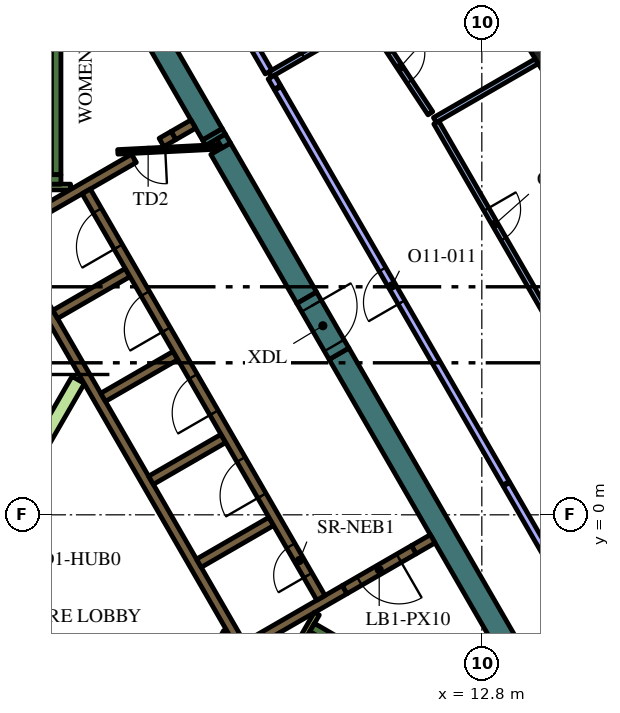
"""IFC4 building model, lengths in metres.
Left out: names, types, materials, properties, quantities, classifications, styles, units other than length and angle.
Written with IfcOpenShell. Run it as: python <this file> out.ifc"""

import sys

from ifc_helpers import new_model, si_unit, direction, frame, frame_2d, origin, origin_2d, place, context, subcontext, project, spatial, polyline, rectangle, outline, extrude, element, fill, save


model = new_model("IFC4")
c1 = context("Model", 3, precision=1e-05, world=origin(), true_north=direction((0.0, 1.0)))
c2 = subcontext(c1, "Body", "Model", "MODEL_VIEW")
j1 = project(units=[si_unit("LENGTHUNIT", "METRE"), si_unit("PLANEANGLEUNIT", "RADIAN")], contexts=[c1])
p1 = place(None, origin())
s1 = spatial("IfcSite", under=j1, at=p1, CompositionType="ELEMENT")
p2 = place(p1, origin())
s2 = spatial("IfcBuilding", under=s1, at=p2, CompositionType="ELEMENT")
p3 = place(p2, frame((0.0, 0.0, 267.0)))
s3 = spatial("IfcBuildingStorey", under=s2, at=p3, CompositionType="ELEMENT", Elevation=267.0)
p4 = place(p3, frame((14.556, 12.098, 0.0), z_axis=(0.0, 0.0, 1.0), x_axis=(-0.525609744083, 0.850725805959, 0.0)))
e1 = element("IfcColumn", 1, at=p4, inside=s3, PredefinedType="COLUMN", context=c2, shape_type="SweptSolid", body=[
    extrude(rectangle(XDim=1.0, YDim=0.7, at=origin_2d()), origin(), (0.0, 0.0, 1.0), 4.2),
])
p5 = place(p3, frame((9.042, 4.239, 0.0), z_axis=(0.0, 0.0, 1.0), x_axis=(0.500005785455, -0.866022063525, 0.0)))
e2 = element("IfcWall", 2, at=p5, inside=s3, PredefinedType="SOLIDWALL", context=c2, shape_type="SweptSolid", body=[
    extrude(rectangle(XDim=12.406, YDim=0.6, at=frame_2d((6.203, 0.0))), origin(), (0.0, 0.0, 1.0), 4.2),
])
p6 = place(p3, frame((5.709, 10.012, 0.0), z_axis=(0.0, 0.0, 1.0), x_axis=(0.500399834964, -0.865794435861, 0.0)))
e3 = element("IfcWall", 3, at=p6, inside=s3, PredefinedType="SOLIDWALL", context=c2, shape_type="SweptSolid", body=[
    extrude(rectangle(XDim=0.166, YDim=0.6, at=frame_2d((0.083, 0.0))), origin(), (0.0, 0.0, 1.0), 4.2),
])
p7 = place(p3, frame((5.928, 9.633, 0.0), z_axis=(0.0, 0.0, 1.0), x_axis=(0.499983823482, -0.8660347431, 0.0)))
e4 = element("IfcWall", 4, at=p7, inside=s3, PredefinedType="SOLIDWALL", context=c2, shape_type="SweptSolid", body=[
    extrude(rectangle(XDim=4.528, YDim=0.6, at=frame_2d((2.264, 0.0))), origin(), (0.0, 0.0, 1.0), 4.2),
])
p8 = place(p3, origin())
e5 = element("IfcWall", 5, at=p8, inside=s3, PredefinedType="SOLIDWALL", context=c2, shape_type="SweptSolid", body=[
    extrude(outline(polyline([(6.053, 10.016), (6.187, 9.784), (5.961, 9.654), (5.827, 9.886), (6.053, 10.016)])), origin(), (0.0, 0.0, 1.0), 4.2),
])
p9 = place(p3, frame((1.989, 16.456, 0.0), z_axis=(0.0, 0.0, 1.0), x_axis=(0.499990476767, -0.866030901956, 0.0)))
e6 = element("IfcWall", 6, at=p9, inside=s3, PredefinedType="SOLIDWALL", context=c2, shape_type="SweptSolid", body=[
    extrude(rectangle(XDim=7.438, YDim=0.6, at=frame_2d((3.719, 0.0))), origin(), (0.0, 0.0, 1.0), 4.2),
])
p10 = place(p3, frame((8.334, -2.964, 0.0), z_axis=(0.0, 0.0, 1.0), x_axis=(0.866016039709, -0.500016218704, 0.0)))
e7 = element("IfcWall", 7, at=p10, inside=s3, PredefinedType="SOLIDWALL", context=c2, shape_type="SweptSolid", body=[
    extrude(rectangle(XDim=7.05, YDim=0.25, at=frame_2d((3.525, 0.0))), origin(), (0.0, 0.0, 1.0), 4.2),
])
p11 = place(p3, frame((8.168, -3.503, 0.0), z_axis=(0.0, 0.0, 1.0), x_axis=(0.49972245349, 0.866185586049, 0.0)))
e8 = element("IfcWall", 8, at=p11, inside=s3, PredefinedType="SOLIDWALL", context=c2, shape_type="SweptSolid", body=[
    extrude(rectangle(XDim=0.425, YDim=0.25, at=frame_2d((0.212, 0.0))), origin(), (0.0, 0.0, 1.0), 4.2),
])
p12 = place(p3, frame((1.6, 8.95, 0.0), z_axis=(0.0, 0.0, 1.0), x_axis=(0.0, 1.0, 0.0)))
e9 = element("IfcWall", 9, at=p12, inside=s3, PredefinedType="SOLIDWALL", context=c2, shape_type="SweptSolid", body=[
    extrude(rectangle(XDim=6.8, YDim=0.25, at=frame_2d((3.4, 0.0))), origin(), (0.0, 0.0, 1.0), 4.2),
])
p13 = place(p3, frame((1.05, 8.825, 0.0), z_axis=(0.0, 0.0, 1.0), x_axis=(1.0, 0.0, 0.0)))
e10 = element("IfcWall", 10, at=p13, inside=s3, PredefinedType="SOLIDWALL", context=c2, shape_type="SweptSolid", body=[
    extrude(rectangle(XDim=0.675, YDim=0.25, at=frame_2d((0.337, 0.0))), origin(), (0.0, 0.0, 1.0), 4.2),
])
p14 = place(p3, frame((11.507, -0.631, 0.0), z_axis=(0.0, 0.0, 1.0), x_axis=(-0.866093731455, -0.499881634324, 0.0)))
e11 = element("IfcWall", 11, at=p14, inside=s3, PredefinedType="SOLIDWALL", context=c2, shape_type="SweptSolid", body=[
    extrude(rectangle(XDim=0.575, YDim=0.25, at=frame_2d((0.288, 0.0))), origin(), (0.0, 0.0, 1.0), 4.2),
])
p15 = place(p3, frame((6.568, -3.627, 0.0), z_axis=(0.0, 0.0, 1.0), x_axis=(-0.499999455981, 0.866025717874, 0.0)))
e12 = element("IfcWall", 12, at=p15, inside=s3, PredefinedType="SOLIDWALL", context=c2, shape_type="SweptSolid", body=[
    extrude(rectangle(XDim=11.978, YDim=0.25, at=frame_2d((5.989, 0.0))), origin(), (0.0, 0.0, 1.0), 4.2),
])
p16 = place(p3, frame((3.647, 9.38, 0.0), z_axis=(0.0, 0.0, 1.0), x_axis=(-0.866025015791, -0.500000672024, 0.0)))
e13 = element("IfcWall", 13, at=p16, inside=s3, PredefinedType="SOLIDWALL", context=c2, shape_type="SweptSolid", body=[
    extrude(rectangle(XDim=3.849, YDim=0.25, at=frame_2d((1.924, 0.0))), origin(), (0.0, 0.0, 1.0), 4.2),
])
p17 = place(p3, frame((1.574, 5.274, 0.0), z_axis=(0.0, 0.0, 1.0), x_axis=(0.866028486751, 0.499994660107, 0.0)))
e14 = element("IfcWall", 14, at=p17, inside=s3, PredefinedType="SOLIDWALL", context=c2, shape_type="SweptSolid", body=[
    extrude(rectangle(XDim=2.2, YDim=0.25, at=frame_2d((1.1, 0.0))), origin(), (0.0, 0.0, 1.0), 4.2),
])
for number, where, z_axis, x_axis in (
    (15, (2.834, 3.091, 0.0), (0.0, 0.0, 1.0), (0.866, 0.5, 0.0)),
    (16, (4.094, 0.909, 0.0), (0.0, 0.0, 1.0), (0.866, 0.5, 0.0)),
    (17, (5.354, -1.274, 0.0), (0.0, 0.0, 1.0), (0.866, 0.5, 0.0)),
):
    element("IfcWall", number, at=place(p3, frame(where, z_axis=z_axis, x_axis=x_axis)), inside=s3, PredefinedType="SOLIDWALL", context=c2, shape_type="SweptSolid", body=[
        extrude(rectangle(XDim=2.2, YDim=0.25, at=frame_2d((1.1, 0.0))), origin(), (0.0, 0.0, 1.0), 4.2),
    ])
p18 = place(p3, frame((6.614, -3.456, 0.0), z_axis=(0.0, 0.0, 1.0), x_axis=(0.866032512851, 0.499987686533, 0.0)))
e18 = element("IfcWall", 18, at=p18, inside=s3, PredefinedType="SOLIDWALL", context=c2, shape_type="SweptSolid", body=[
    extrude(rectangle(XDim=2.975, YDim=0.25, at=frame_2d((1.487, 0.0))), origin(), (0.0, 0.0, 1.0), 4.2),
])
p19 = place(p3, frame((4.688, 9.981, 0.0), z_axis=(0.0, 0.0, 1.0), x_axis=(-0.865974312977, -0.500088481434, 0.0)))
e19 = element("IfcWall", 19, at=p19, inside=s3, PredefinedType="SOLIDWALL", context=c2, shape_type="SweptSolid", body=[
    extrude(rectangle(XDim=0.366, YDim=0.25, at=frame_2d((0.183, 0.0))), origin(), (0.0, 0.0, 1.0), 4.2),
])
p20 = place(p3, frame((4.689, 9.982, 0.0), z_axis=(0.0, 0.0, 1.0), x_axis=(0.865947592822, 0.500134748329, 0.0)))
e20 = element("IfcWall", 20, at=p20, inside=s3, PredefinedType="SOLIDWALL", context=c2, shape_type="SweptSolid", body=[
    extrude(rectangle(XDim=0.598, YDim=0.25, at=frame_2d((0.299, 0.0))), origin(), (0.0, 0.0, 1.0), 4.2),
])
p21 = place(p3, frame((1.05, 8.625, 0.0), z_axis=(0.0, 0.0, 1.0), x_axis=(1.0, 0.0, 0.0)))
e21 = element("IfcWall", 21, at=p21, inside=s3, PredefinedType="PARTITIONING", context=c2, shape_type="SweptSolid", body=[
    extrude(rectangle(XDim=0.929, YDim=0.15, at=frame_2d((0.464, 0.0))), origin(), (0.0, 0.0, 1.0), 3.55),
])
p22 = place(p3, frame((8.459, -2.599, 0.0), z_axis=(0.0, 0.0, 1.0), x_axis=(-0.500041054325, -0.866001699761, 0.0)))
e22 = element("IfcWall", 22, at=p22, inside=s3, PredefinedType="PARTITIONING", context=c2, shape_type="SweptSolid", body=[
    extrude(rectangle(XDim=0.929, YDim=0.15, at=frame_2d((0.464, 0.0))), origin(), (0.0, 0.0, 1.0), 4.2),
])
p23 = place(p3, frame((5.705, -3.718, 0.0), z_axis=(0.0, 0.0, 1.0), x_axis=(0.499962090823, 0.866047289552, 0.0)))
e23 = element("IfcWall", 23, at=p23, inside=s3, PredefinedType="PARTITIONING", context=c2, shape_type="SweptSolid", body=[
    extrude(rectangle(XDim=0.735, YDim=0.15, at=frame_2d((0.367, 0.0))), origin(), (0.0, 0.0, 1.0), 3.55),
])
e24 = element("IfcWall", 24, at=p8, inside=s3, PredefinedType="PARTITIONING", context=c2, shape_type="SweptSolid", body=[
    extrude(outline(polyline([(2.017, 3.643), (2.342, 3.456), (0.785, 0.76), (0.46, 0.947), (2.017, 3.643)])), origin(), (0.0, 0.0, 1.0), 3.55),
])
p24 = place(p3, frame((8.565, -2.185, 0.0), z_axis=(0.0, 0.0, 1.0), x_axis=(-0.499997954832, 0.866026584559, 0.0)))
e25 = element("IfcWall", 25, at=p24, inside=s3, PredefinedType="SOLIDWALL", context=c2, shape_type="SweptSolid", body=[
    extrude(rectangle(XDim=12.35, YDim=0.25, at=frame_2d((6.175, 0.0))), origin(), (0.0, 0.0, 1.0), 4.2),
])
p25 = place(p24, frame((0.685, 0.0, 0.0)))
e26 = element("IfcOpeningElement", 26, at=p25, cuts=e25, PredefinedType="OPENING", context=c2, shape_type="SweptSolid", body=[
    extrude(rectangle(XDim=0.9, YDim=2.1, at=frame_2d((0.45, 1.05))), frame((0.0, 0.135, 0.0), z_axis=(0.0, -1.0, 0.0), x_axis=(1.0, 0.0, 0.0)), (0.0, 0.0, 1.0), 0.27),
])
p26 = place(p24, frame((3.105, 0.0, 0.0)))
e27 = element("IfcOpeningElement", 27, at=p26, cuts=e25, PredefinedType="OPENING", context=c2, shape_type="SweptSolid", body=[
    extrude(rectangle(XDim=1.1, YDim=2.1, at=frame_2d((0.55, 1.05))), frame((0.0, 0.135, 0.0), z_axis=(0.0, -1.0, 0.0), x_axis=(1.0, 0.0, 0.0)), (0.0, 0.0, 1.0), 0.27),
])
p27 = place(p24, frame((5.625, 0.0, 0.0)))
e28 = element("IfcOpeningElement", 28, at=p27, cuts=e25, PredefinedType="OPENING", context=c2, shape_type="SweptSolid", body=[
    extrude(rectangle(XDim=1.1, YDim=2.1, at=frame_2d((0.55, 1.05))), frame((0.0, 0.135, 0.0), z_axis=(0.0, -1.0, 0.0), x_axis=(1.0, 0.0, 0.0)), (0.0, 0.0, 1.0), 0.27),
])
p28 = place(p24, frame((8.145, 0.0, 0.0)))
e29 = element("IfcOpeningElement", 29, at=p28, cuts=e25, PredefinedType="OPENING", context=c2, shape_type="SweptSolid", body=[
    extrude(rectangle(XDim=1.1, YDim=2.1, at=frame_2d((0.55, 1.05))), frame((0.0, 0.135, 0.0), z_axis=(0.0, -1.0, 0.0), x_axis=(1.0, 0.0, 0.0)), (0.0, 0.0, 1.0), 0.27),
])
p29 = place(p24, frame((10.665, 0.0, 0.0)))
e30 = element("IfcOpeningElement", 30, at=p29, cuts=e25, PredefinedType="OPENING", context=c2, shape_type="SweptSolid", body=[
    extrude(rectangle(XDim=1.1, YDim=2.1, at=frame_2d((0.55, 1.05))), frame((0.0, 0.135, 0.0), z_axis=(0.0, -1.0, 0.0), x_axis=(1.0, 0.0, 0.0)), (0.0, 0.0, 1.0), 0.27),
])
p30 = place(p3, frame((5.917, 9.684, 0.0), z_axis=(0.0, 0.0, 1.0), x_axis=(-0.998758194515, -0.049820366212, 0.0)))
e31 = element("IfcWall", 31, at=p30, inside=s3, PredefinedType="PARTITIONING", context=c2, shape_type="SweptSolid", body=[
    extrude(rectangle(XDim=2.7, YDim=0.12, at=frame_2d((1.35, 0.0))), origin(), (0.0, 0.0, 1.0), 3.55),
])
p31 = place(p30, frame((1.45, 0.0, 0.0)))
e32 = element("IfcOpeningElement", 32, at=p31, cuts=e31, PredefinedType="OPENING", context=c2, shape_type="SweptSolid", body=[
    extrude(rectangle(XDim=0.9, YDim=2.1, at=frame_2d((0.45, 1.05))), frame((0.0, 0.07, 0.0), z_axis=(0.0, -1.0, 0.0), x_axis=(1.0, 0.0, 0.0)), (0.0, 0.0, 1.0), 0.14),
])
p32 = place(p3, frame((11.009, -0.919, 0.0), z_axis=(0.0, 0.0, 1.0), x_axis=(-0.866059744384, -0.49994051562, 0.0)))
e33 = element("IfcWall", 33, at=p32, inside=s3, PredefinedType="SOLIDWALL", context=c2, shape_type="SweptSolid", body=[
    extrude(rectangle(XDim=2.1, YDim=0.25, at=frame_2d((1.05, 0.0))), origin(), (0.0, 0.0, 1.0), 4.2),
])
p33 = place(p32, frame((0.45, 0.0, 0.0)))
e34 = element("IfcOpeningElement", 34, at=p33, cuts=e33, PredefinedType="OPENING", context=c2, shape_type="SweptSolid", body=[
    extrude(rectangle(XDim=1.2, YDim=2.1, at=frame_2d((0.6, 1.05))), frame((0.0, 0.135, 0.0), z_axis=(0.0, -1.0, 0.0), x_axis=(1.0, 0.0, 0.0)), (0.0, 0.0, 1.0), 0.27),
])
p34 = place(p3, frame((8.192, 5.711, 0.0), z_axis=(0.0, 0.0, 1.0), x_axis=(0.500062241894, -0.865989465428, 0.0)))
e35 = element("IfcWall", 35, at=p34, inside=s3, PredefinedType="SOLIDWALL", context=c2, shape_type="SweptSolid", body=[
    extrude(rectangle(XDim=1.7, YDim=0.6, at=frame_2d((0.85, 0.0))), origin(), (0.0, 0.0, 1.0), 4.2),
])
p35 = place(p34, frame((0.25, 0.0, 0.0)))
e36 = element("IfcOpeningElement", 36, at=p35, cuts=e35, PredefinedType="OPENING", context=c2, shape_type="SweptSolid", body=[
    extrude(rectangle(XDim=1.2, YDim=2.1, at=frame_2d((0.6, 1.05))), frame((0.0, 0.31, 0.0), z_axis=(0.0, -1.0, 0.0), x_axis=(1.0, 0.0, 0.0)), (0.0, 0.0, 1.0), 0.62),
])
p36 = place(p3, frame((11.564, 10.387, 0.0), z_axis=(0.0, 0.0, 1.0), x_axis=(0.86604641216, 0.499963610661, 0.0)))
e37 = element("IfcWall", 37, at=p36, inside=s3, PredefinedType="PARTITIONING", context=c2, shape_type="SweptSolid", body=[
    extrude(rectangle(XDim=3.096, YDim=0.15, at=frame_2d((1.548, 0.0))), origin(), (0.0, 0.0, 1.0), 3.55),
])
p37 = place(p3, frame((11.602, 10.322, 0.0), z_axis=(0.0, 0.0, 1.0), x_axis=(0.499989914735, -0.866031226437, 0.0)))
e38 = element("IfcWall", 38, at=p37, inside=s3, PredefinedType="PARTITIONING", context=c2, shape_type="SweptSolid", body=[
    extrude(rectangle(XDim=6.137, YDim=0.15, at=frame_2d((3.068, 0.0))), origin(), (0.0, 0.0, 1.0), 3.55),
])
p38 = place(p37, frame((2.637, 0.0, 0.0)))
e39 = element("IfcOpeningElement", 39, at=p38, cuts=e38, PredefinedType="OPENING", context=c2, shape_type="SweptSolid", body=[
    extrude(rectangle(XDim=0.9, YDim=2.1, at=frame_2d((0.45, 1.05))), frame((0.0, 0.085, 0.0), z_axis=(0.0, -1.0, 0.0), x_axis=(1.0, 0.0, 0.0)), (0.0, 0.0, 1.0), 0.17),
])
p39 = place(p3, frame((9.795, 13.068, 0.0), z_axis=(0.0, 0.0, 1.0), x_axis=(0.550767347659, -0.834658809786, 0.0)))
e40 = element("IfcWall", 40, at=p39, inside=s3, PredefinedType="PARTITIONING", context=c2, shape_type="SweptSolid", body=[
    extrude(rectangle(XDim=2.999, YDim=0.15, at=frame_2d((1.5, 0.0))), origin(), (0.0, 0.0, 1.0), 3.55),
])
p40 = place(p39, frame((1.099, 0.0, 0.0)))
e41 = element("IfcOpeningElement", 41, at=p40, cuts=e40, PredefinedType="OPENING", context=c2, shape_type="SweptSolid", body=[
    extrude(rectangle(XDim=0.9, YDim=2.1, at=frame_2d((0.45, 1.05))), frame((0.0, 0.085, 0.0), z_axis=(0.0, -1.0, 0.0), x_axis=(1.0, 0.0, 0.0)), (0.0, 0.0, 1.0), 0.17),
])
p41 = place(p3, frame((7.226, 11.585, 0.0), z_axis=(0.0, 0.0, 1.0), x_axis=(0.866021079084, 0.500007490527, 0.0)))
e42 = element("IfcWall", 42, at=p41, inside=s3, PredefinedType="PARTITIONING", context=c2, shape_type="SweptSolid", body=[
    extrude(rectangle(XDim=2.892, YDim=0.15, at=frame_2d((1.446, 0.0))), origin(), (0.0, 0.0, 1.0), 3.55),
])
p42 = place(p41, frame((1.0, 0.0, 0.0)))
e43 = element("IfcOpeningElement", 43, at=p42, cuts=e42, PredefinedType="OPENING", context=c2, shape_type="SweptSolid", body=[
    extrude(rectangle(XDim=0.9, YDim=2.1, at=frame_2d((0.45, 1.05))), frame((0.0, 0.085, 0.0), z_axis=(0.0, -1.0, 0.0), x_axis=(1.0, 0.0, 0.0)), (0.0, 0.0, 1.0), 0.17),
])
p43 = place(p3, frame((13.436, 0.829, 0.0), z_axis=(0.0, 0.0, 1.0), x_axis=(-0.49999894854, 0.866026010844, 0.0)))
e44 = element("IfcWall", 44, at=p43, inside=s3, PredefinedType="PARTITIONING", context=c2, shape_type="SweptSolid", body=[
    extrude(rectangle(XDim=12.0, YDim=0.2, at=frame_2d((6.0, 0.0))), origin(), (0.0, 0.0, 1.0), 3.55),
])
p44 = place(p43, frame((5.5, 0.0, 0.0)))
e45 = element("IfcOpeningElement", 45, at=p44, cuts=e44, PredefinedType="OPENING", context=c2, shape_type="SweptSolid", body=[
    extrude(rectangle(XDim=1.0, YDim=2.1, at=frame_2d((0.5, 1.05))), frame((0.0, 0.11, 0.0), z_axis=(0.0, -1.0, 0.0), x_axis=(1.0, 0.0, 0.0)), (0.0, 0.0, 1.0), 0.22),
])
p45 = place(p3, frame((7.421, 11.247, 0.0), z_axis=(0.0, 0.0, 1.0), x_axis=(-0.500303403544, 0.865850162789, 0.0)))
e46 = element("IfcWall", 46, at=p45, inside=s3, PredefinedType="PARTITIONING", context=c2, shape_type="SweptSolid", body=[
    extrude(rectangle(XDim=0.315, YDim=0.2, at=frame_2d((0.158, 0.0))), origin(), (0.0, 0.0, 1.0), 3.55),
])
p46 = place(p3, frame((17.565, -6.324, 0.0), z_axis=(0.0, 0.0, 1.0), x_axis=(-0.499977548053, 0.866038366034, 0.0)))
e47 = element("IfcWall", 47, at=p46, inside=s3, PredefinedType="PARTITIONING", context=c2, shape_type="SweptSolid", body=[
    extrude(rectangle(XDim=8.229, YDim=0.2, at=frame_2d((4.115, 0.0))), origin(), (0.0, 0.0, 1.0), 3.55),
])
p47 = place(p3, frame((7.188, 11.65, 0.0), z_axis=(0.0, 0.0, 1.0), x_axis=(-0.499989634868, 0.866031388014, 0.0)))
e48 = element("IfcWall", 48, at=p47, inside=s3, PredefinedType="PARTITIONING", context=c2, shape_type="SweptSolid", body=[
    extrude(rectangle(XDim=7.303, YDim=0.2, at=frame_2d((3.652, 0.0))), origin(), (0.0, 0.0, 1.0), 3.55),
])
p48 = place(p25, origin())
e49 = element("IfcDoor", 49, at=p48, inside=s3, OperationType="SINGLE_SWING_LEFT", PredefinedType="DOOR", context=c2, shape_type="SweptSolid", body=[
    extrude(rectangle(XDim=0.9, YDim=2.1, at=frame_2d((0.45, 1.05))), frame((0.0, 0.025, 0.0), z_axis=(0.0, -1.0, 0.0), x_axis=(1.0, 0.0, 0.0)), (0.0, 0.0, 1.0), 0.05),
])
fill(e26, e49)
p49 = place(p26, origin())
e50 = element("IfcDoor", 50, at=p49, inside=s3, OperationType="DOUBLE_DOOR_SLIDING", PredefinedType="DOOR", context=c2, shape_type="SweptSolid", body=[
    extrude(rectangle(XDim=1.1, YDim=2.1, at=frame_2d((0.55, 1.05))), frame((0.0, 0.025, 0.0), z_axis=(0.0, -1.0, 0.0), x_axis=(1.0, 0.0, 0.0)), (0.0, 0.0, 1.0), 0.05),
])
fill(e27, e50)
p50 = place(p27, origin())
e51 = element("IfcDoor", 51, at=p50, inside=s3, OperationType="DOUBLE_DOOR_SLIDING", PredefinedType="DOOR", context=c2, shape_type="SweptSolid", body=[
    extrude(rectangle(XDim=1.1, YDim=2.1, at=frame_2d((0.55, 1.05))), frame((0.0, 0.025, 0.0), z_axis=(0.0, -1.0, 0.0), x_axis=(1.0, 0.0, 0.0)), (0.0, 0.0, 1.0), 0.05),
])
fill(e28, e51)
p51 = place(p28, origin())
e52 = element("IfcDoor", 52, at=p51, inside=s3, OperationType="DOUBLE_DOOR_SLIDING", PredefinedType="DOOR", context=c2, shape_type="SweptSolid", body=[
    extrude(rectangle(XDim=1.1, YDim=2.1, at=frame_2d((0.55, 1.05))), frame((0.0, 0.025, 0.0), z_axis=(0.0, -1.0, 0.0), x_axis=(1.0, 0.0, 0.0)), (0.0, 0.0, 1.0), 0.05),
])
fill(e29, e52)
p52 = place(p29, origin())
e53 = element("IfcDoor", 53, at=p52, inside=s3, OperationType="DOUBLE_DOOR_SLIDING", PredefinedType="DOOR", context=c2, shape_type="SweptSolid", body=[
    extrude(rectangle(XDim=1.1, YDim=2.1, at=frame_2d((0.55, 1.05))), frame((0.0, 0.025, 0.0), z_axis=(0.0, -1.0, 0.0), x_axis=(1.0, 0.0, 0.0)), (0.0, 0.0, 1.0), 0.05),
])
fill(e30, e53)
p53 = place(p31, origin())
e54 = element("IfcDoor", 54, at=p53, inside=s3, OperationType="SINGLE_SWING_LEFT", PredefinedType="DOOR", context=c2, shape_type="SweptSolid", body=[
    extrude(rectangle(XDim=0.9, YDim=2.1, at=frame_2d((0.45, 1.05))), frame((0.0, 0.025, 0.0), z_axis=(0.0, -1.0, 0.0), x_axis=(1.0, 0.0, 0.0)), (0.0, 0.0, 1.0), 0.05),
])
fill(e32, e54)
p54 = place(p33, origin())
e55 = element("IfcDoor", 55, at=p54, inside=s3, OperationType="SINGLE_SWING_LEFT", PredefinedType="DOOR", context=c2, shape_type="SweptSolid", body=[
    extrude(rectangle(XDim=1.2, YDim=2.1, at=frame_2d((0.6, 1.05))), frame((0.0, 0.025, 0.0), z_axis=(0.0, -1.0, 0.0), x_axis=(1.0, 0.0, 0.0)), (0.0, 0.0, 1.0), 0.05),
])
fill(e34, e55)
p55 = place(p35, origin())
e56 = element("IfcDoor", 56, at=p55, inside=s3, OperationType="SINGLE_SWING_LEFT", PredefinedType="DOOR", context=c2, shape_type="SweptSolid", body=[
    extrude(rectangle(XDim=1.2, YDim=2.1, at=frame_2d((0.6, 1.05))), frame((0.0, 0.025, 0.0), z_axis=(0.0, -1.0, 0.0), x_axis=(1.0, 0.0, 0.0)), (0.0, 0.0, 1.0), 0.05),
])
fill(e36, e56)
p56 = place(p38, origin())
e57 = element("IfcDoor", 57, at=p56, inside=s3, OperationType="SINGLE_SWING_RIGHT", PredefinedType="DOOR", context=c2, shape_type="SweptSolid", body=[
    extrude(rectangle(XDim=0.9, YDim=2.1, at=frame_2d((0.45, 1.05))), frame((0.0, 0.025, 0.0), z_axis=(0.0, -1.0, 0.0), x_axis=(1.0, 0.0, 0.0)), (0.0, 0.0, 1.0), 0.05),
])
fill(e39, e57)
p57 = place(p40, origin())
e58 = element("IfcDoor", 58, at=p57, inside=s3, OperationType="SINGLE_SWING_RIGHT", PredefinedType="DOOR", context=c2, shape_type="SweptSolid", body=[
    extrude(rectangle(XDim=0.9, YDim=2.1, at=frame_2d((0.45, 1.05))), frame((0.0, 0.025, 0.0), z_axis=(0.0, -1.0, 0.0), x_axis=(1.0, 0.0, 0.0)), (0.0, 0.0, 1.0), 0.05),
])
fill(e41, e58)
p58 = place(p44, origin())
e59 = element("IfcDoor", 59, at=p58, inside=s3, OperationType="SINGLE_SWING_RIGHT", PredefinedType="DOOR", context=c2, shape_type="SweptSolid", body=[
    extrude(rectangle(XDim=1.0, YDim=2.1, at=frame_2d((0.5, 1.05))), frame((0.0, 0.025, 0.0), z_axis=(0.0, -1.0, 0.0), x_axis=(1.0, 0.0, 0.0)), (0.0, 0.0, 1.0), 0.05),
])
fill(e45, e59)
p59 = place(p42, origin())
e60 = element("IfcDoor", 60, at=p59, inside=s3, OperationType="SINGLE_SWING_RIGHT", PredefinedType="DOOR", context=c2, shape_type="SweptSolid", body=[
    extrude(rectangle(XDim=0.9, YDim=2.1, at=frame_2d((0.45, 1.05))), frame((0.0, 0.025, 0.0), z_axis=(0.0, -1.0, 0.0), x_axis=(1.0, 0.0, 0.0)), (0.0, 0.0, 1.0), 0.05),
])
fill(e43, e60)
save(model, sys.argv[1])
